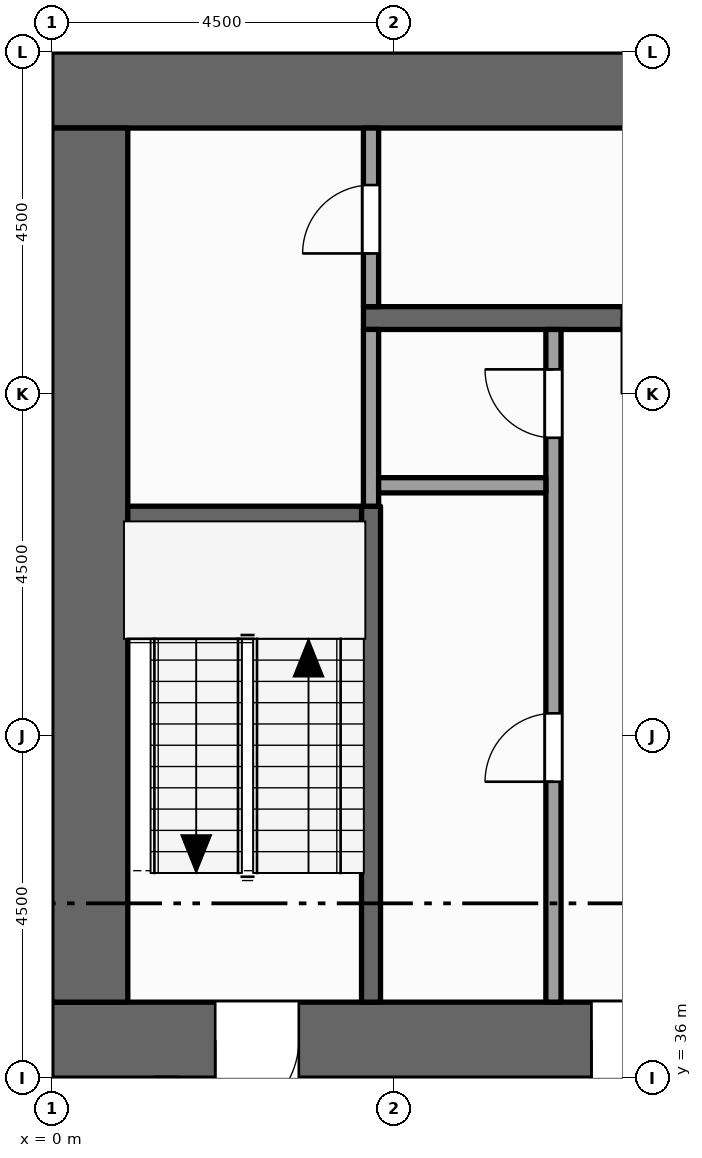
"""IFC4 building model, lengths in metres.
Left out: names, types, materials, properties, quantities, classifications, styles, units other than length and angle.
Written with IfcOpenShell. Run it as: python <this file> out.ifc"""

import sys

from ifc_helpers import new_model, si_unit, direction, frame, frame_2d, origin, place, context, subcontext, project, spatial, rectangle, extrude, element, fill, save


model = new_model("IFC4")
c1 = context("Model", 3, precision=1e-05, world=origin(), true_north=direction((0.0, 1.0)))
c2 = subcontext(c1, "Body", "Model", "MODEL_VIEW")
j1 = project(units=[si_unit("LENGTHUNIT", "METRE"), si_unit("PLANEANGLEUNIT", "RADIAN")], contexts=[c1])
p1 = place(None, origin())
s1 = spatial("IfcSite", under=j1, at=p1, CompositionType="ELEMENT")
p2 = place(p1, origin())
s2 = spatial("IfcBuilding", under=s1, at=p2, CompositionType="ELEMENT")
p3 = place(p2, frame((0.0, 0.0, 239.0)))
s3 = spatial("IfcBuildingStorey", under=s2, at=p3, CompositionType="ELEMENT", Elevation=239.0)
p4 = place(p3, frame((0.0, 36.5, -0.15), z_axis=(0.0, 0.0, 1.0), x_axis=(1.0, 0.0, 0.0)))
e1 = element("IfcWall", 1, at=p4, inside=s3, PredefinedType="SHEAR", context=c2, shape_type="SweptSolid", body=[
    extrude(rectangle(XDim=22.5, YDim=1.0, at=frame_2d((11.25, 0.0))), origin(), (0.0, 0.0, 1.0), 4.0),
])
p5 = place(p4, frame((7.1, 0.0, 0.15)))
e2 = element("IfcOpeningElement", 2, at=p5, cuts=e1, PredefinedType="OPENING", context=c2, shape_type="SweptSolid", body=[
    extrude(rectangle(XDim=1.8, YDim=2.1, at=frame_2d((0.9, 1.05))), frame((0.0, 0.51, 0.0), z_axis=(0.0, -1.0, 0.0), x_axis=(1.0, 0.0, 0.0)), (0.0, 0.0, 1.0), 1.02),
])
p6 = place(p4, frame((13.15, 0.0, 0.15)))
e3 = element("IfcOpeningElement", 3, at=p6, cuts=e1, PredefinedType="OPENING", context=c2, shape_type="SweptSolid", body=[
    extrude(rectangle(XDim=1.1, YDim=2.1, at=frame_2d((0.55, 1.05))), frame((0.0, 0.51, 0.0), z_axis=(0.0, -1.0, 0.0), x_axis=(1.0, 0.0, 0.0)), (0.0, 0.0, 1.0), 1.02),
])
p7 = place(p4, frame((2.15, 0.0, 0.15)))
e4 = element("IfcOpeningElement", 4, at=p7, cuts=e1, PredefinedType="OPENING", context=c2, shape_type="SweptSolid", body=[
    extrude(rectangle(XDim=1.1, YDim=2.1, at=frame_2d((0.55, 1.05))), frame((0.0, 0.51, 0.0), z_axis=(0.0, -1.0, 0.0), x_axis=(1.0, 0.0, 0.0)), (0.0, 0.0, 1.0), 1.02),
])
p8 = place(p4, frame((19.35, 0.0, 0.15)))
e5 = element("IfcOpeningElement", 5, at=p8, cuts=e1, PredefinedType="OPENING", context=c2, shape_type="SweptSolid", body=[
    extrude(rectangle(XDim=1.1, YDim=2.1, at=frame_2d((0.55, 1.05))), frame((0.0, 0.51, 0.0), z_axis=(0.0, -1.0, 0.0), x_axis=(1.0, 0.0, 0.0)), (0.0, 0.0, 1.0), 1.02),
])
p9 = place(p3, frame((0.0, 49.0, -0.15), z_axis=(0.0, 0.0, 1.0), x_axis=(1.0, 0.0, 0.0)))
e6 = element("IfcWall", 6, at=p9, inside=s3, PredefinedType="SHEAR", context=c2, shape_type="SweptSolid", body=[
    extrude(rectangle(XDim=22.5, YDim=1.0, at=frame_2d((11.25, 0.0))), origin(), (0.0, 0.0, 1.0), 4.0),
])
p10 = place(p3, frame((0.5, 37.0, -0.15), z_axis=(0.0, 0.0, 1.0), x_axis=(0.0, 1.0, 0.0)))
e7 = element("IfcWall", 7, at=p10, inside=s3, PredefinedType="SHEAR", context=c2, shape_type="SweptSolid", body=[
    extrude(rectangle(XDim=11.5, YDim=1.0, at=frame_2d((5.75, 0.0))), origin(), (0.0, 0.0, 1.0), 4.0),
])
p11 = place(p3, frame((4.2, 37.0, 0.0), z_axis=(0.0, 0.0, 1.0), x_axis=(0.0, 1.0, 0.0)))
e8 = element("IfcWall", 8, at=p11, inside=s3, PredefinedType="SHEAR", context=c2, shape_type="SweptSolid", body=[
    extrude(rectangle(XDim=6.525, YDim=0.25, at=frame_2d((3.262, 0.0))), origin(), (0.0, 0.0, 1.0), 3.7),
])
p12 = place(p3, frame((4.2, 43.525, 0.0), z_axis=(0.0, 0.0, 1.0), x_axis=(0.0, 1.0, 0.0)))
e9 = element("IfcWall", 9, at=p12, inside=s3, PredefinedType="PARTITIONING", context=c2, shape_type="SweptSolid", body=[
    extrude(rectangle(XDim=2.325, YDim=0.2, at=frame_2d((1.163, 0.0))), origin(), (0.0, 0.0, 1.0), 3.7),
])
p13 = place(p3, frame((4.2, 46.15, 0.0), z_axis=(0.0, 0.0, 1.0), x_axis=(0.0, 1.0, 0.0)))
e10 = element("IfcWall", 10, at=p13, inside=s3, PredefinedType="PARTITIONING", context=c2, shape_type="SweptSolid", body=[
    extrude(rectangle(XDim=2.35, YDim=0.2, at=frame_2d((1.175, 0.0))), origin(), (0.0, 0.0, 1.0), 3.7),
])
p14 = place(p13, frame((0.7, 0.0, 0.0)))
e11 = element("IfcOpeningElement", 11, at=p14, cuts=e10, PredefinedType="OPENING", context=c2, shape_type="SweptSolid", body=[
    extrude(rectangle(XDim=0.9, YDim=2.1, at=frame_2d((0.45, 1.05))), frame((0.0, 0.11, 0.0), z_axis=(0.0, -1.0, 0.0), x_axis=(1.0, 0.0, 0.0)), (0.0, 0.0, 1.0), 0.22),
])
p15 = place(p3, frame((6.6, 37.0, 0.0), z_axis=(0.0, 0.0, 1.0), x_axis=(0.0, 1.0, 0.0)))
e12 = element("IfcWall", 12, at=p15, inside=s3, PredefinedType="PARTITIONING", context=c2, shape_type="SweptSolid", body=[
    extrude(rectangle(XDim=8.85, YDim=0.2, at=frame_2d((4.425, 0.0))), origin(), (0.0, 0.0, 1.0), 3.7),
])
p16 = place(p15, frame((2.9, 0.0, 0.0)))
e13 = element("IfcOpeningElement", 13, at=p16, cuts=e12, PredefinedType="OPENING", context=c2, shape_type="SweptSolid", body=[
    extrude(rectangle(XDim=0.9, YDim=2.1, at=frame_2d((0.45, 1.05))), frame((0.0, 0.11, 0.0), z_axis=(0.0, -1.0, 0.0), x_axis=(1.0, 0.0, 0.0)), (0.0, 0.0, 1.0), 0.22),
])
p17 = place(p15, frame((7.425, 0.0, 0.0)))
e14 = element("IfcOpeningElement", 14, at=p17, cuts=e12, PredefinedType="OPENING", context=c2, shape_type="SweptSolid", body=[
    extrude(rectangle(XDim=0.9, YDim=2.1, at=frame_2d((0.45, 1.05))), frame((0.0, 0.11, 0.0), z_axis=(0.0, -1.0, 0.0), x_axis=(1.0, 0.0, 0.0)), (0.0, 0.0, 1.0), 0.22),
])
p18 = place(p3, frame((1.0, 43.4, 0.0), z_axis=(0.0, 0.0, 1.0), x_axis=(1.0, 0.0, 0.0)))
e15 = element("IfcWall", 15, at=p18, inside=s3, PredefinedType="SHEAR", context=c2, shape_type="SweptSolid", body=[
    extrude(rectangle(XDim=3.075, YDim=0.25, at=frame_2d((1.538, 0.0))), origin(), (0.0, 0.0, 1.0), 3.7),
])
p19 = place(p3, frame((4.3, 43.8, 0.0), z_axis=(0.0, 0.0, 1.0), x_axis=(1.0, 0.0, 0.0)))
e16 = element("IfcWall", 16, at=p19, inside=s3, PredefinedType="PARTITIONING", context=c2, shape_type="SweptSolid", body=[
    extrude(rectangle(XDim=2.2, YDim=0.2, at=frame_2d((1.1, 0.0))), origin(), (0.0, 0.0, 1.0), 3.7),
])
p20 = place(p3, frame((4.1, 46.0, 0.0), z_axis=(0.0, 0.0, 1.0), x_axis=(1.0, 0.0, 0.0)))
e17 = element("IfcWall", 17, at=p20, inside=s3, PredefinedType="SHEAR", context=c2, shape_type="SweptSolid", body=[
    extrude(rectangle(XDim=14.5, YDim=0.3, at=frame_2d((7.25, 0.0))), origin(), (0.0, 0.0, 1.0), 3.7),
])
p21 = place(p20, frame((3.4, 0.0, 0.0)))
e18 = element("IfcOpeningElement", 18, at=p21, cuts=e17, PredefinedType="OPENING", context=c2, shape_type="SweptSolid", body=[
    extrude(rectangle(XDim=1.0, YDim=2.1, at=frame_2d((0.5, 1.05))), frame((0.0, 0.16, 0.0), z_axis=(0.0, -1.0, 0.0), x_axis=(1.0, 0.0, 0.0)), (0.0, 0.0, 1.0), 0.32),
])
p22 = place(p20, frame((9.1, 0.0, 0.0)))
e19 = element("IfcOpeningElement", 19, at=p22, cuts=e17, PredefinedType="OPENING", context=c2, shape_type="SweptSolid", body=[
    extrude(rectangle(XDim=1.0, YDim=2.1, at=frame_2d((0.5, 1.05))), frame((0.0, 0.16, 0.0), z_axis=(0.0, -1.0, 0.0), x_axis=(1.0, 0.0, 0.0)), (0.0, 0.0, 1.0), 0.32),
])
p23 = place(p5, origin())
e20 = element("IfcDoor", 20, at=p23, inside=s3, OperationType="DOUBLE_DOOR_SINGLE_SWING", PredefinedType="DOOR", context=c2, shape_type="SweptSolid", body=[
    extrude(rectangle(XDim=1.8, YDim=2.1, at=frame_2d((0.9, 1.05))), frame((0.0, 0.025, 0.0), z_axis=(0.0, -1.0, 0.0), x_axis=(1.0, 0.0, 0.0)), (0.0, 0.0, 1.0), 0.05),
])
fill(e2, e20)
p24 = place(p7, origin())
e21 = element("IfcDoor", 21, at=p24, inside=s3, OperationType="SINGLE_SWING_LEFT", PredefinedType="DOOR", context=c2, shape_type="SweptSolid", body=[
    extrude(rectangle(XDim=1.1, YDim=2.1, at=frame_2d((0.55, 1.05))), frame((0.0, 0.025, 0.0), z_axis=(0.0, -1.0, 0.0), x_axis=(1.0, 0.0, 0.0)), (0.0, 0.0, 1.0), 0.05),
])
fill(e4, e21)
p25 = place(p14, origin())
e22 = element("IfcDoor", 22, at=p25, inside=s3, OperationType="SINGLE_SWING_LEFT", PredefinedType="DOOR", context=c2, shape_type="SweptSolid", body=[
    extrude(rectangle(XDim=0.9, YDim=2.1, at=frame_2d((0.45, 1.05))), frame((0.0, 0.025, 0.0), z_axis=(0.0, -1.0, 0.0), x_axis=(1.0, 0.0, 0.0)), (0.0, 0.0, 1.0), 0.05),
])
fill(e11, e22)
p26 = place(p16, origin())
e23 = element("IfcDoor", 23, at=p26, inside=s3, OperationType="SINGLE_SWING_LEFT", PredefinedType="DOOR", context=c2, shape_type="SweptSolid", body=[
    extrude(rectangle(XDim=0.9, YDim=2.1, at=frame_2d((0.45, 1.05))), frame((0.0, 0.025, 0.0), z_axis=(0.0, -1.0, 0.0), x_axis=(1.0, 0.0, 0.0)), (0.0, 0.0, 1.0), 0.05),
])
fill(e13, e23)
p27 = place(p17, origin())
e24 = element("IfcDoor", 24, at=p27, inside=s3, OperationType="SINGLE_SWING_RIGHT", PredefinedType="DOOR", context=c2, shape_type="SweptSolid", body=[
    extrude(rectangle(XDim=0.9, YDim=2.1, at=frame_2d((0.45, 1.05))), frame((0.0, 0.025, 0.0), z_axis=(0.0, -1.0, 0.0), x_axis=(1.0, 0.0, 0.0)), (0.0, 0.0, 1.0), 0.05),
])
fill(e14, e24)
save(model, sys.argv[1])
